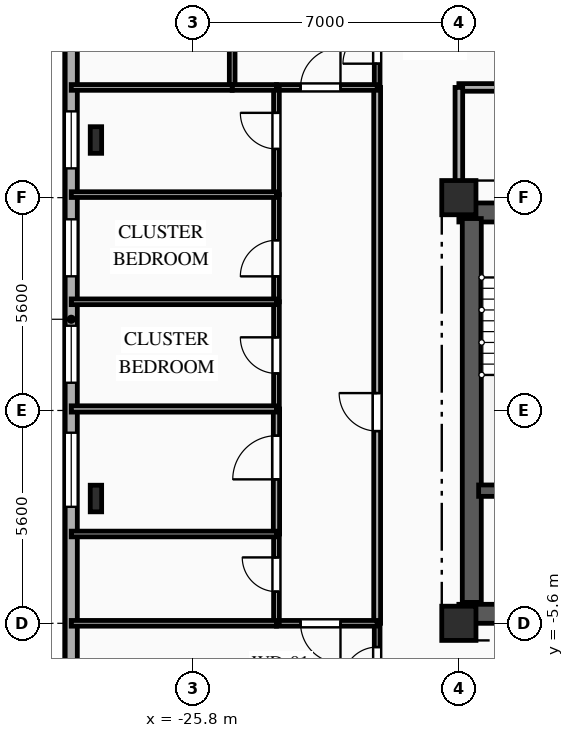
"""IFC4 building model, lengths in metres.
Left out: names, types, materials, properties, quantities, classifications, styles, units other than length and angle.
Written with IfcOpenShell. Run it as: python <this file> out.ifc"""

import sys

from ifc_helpers import new_model, si_unit, direction, frame, frame_2d, origin, origin_2d, place, context, subcontext, project, spatial, rectangle, i_section, extrude, element, fill, save


model = new_model("IFC4")
c1 = context("Model", 3, precision=1e-05, world=origin(), true_north=direction((0.0, 1.0)))
c2 = subcontext(c1, "Body", "Model", "MODEL_VIEW")
j1 = project(units=[si_unit("LENGTHUNIT", "METRE"), si_unit("PLANEANGLEUNIT", "RADIAN")], contexts=[c1])
p1 = place(None, origin())
s1 = spatial("IfcSite", under=j1, at=p1, CompositionType="ELEMENT")
p2 = place(p1, origin())
s2 = spatial("IfcBuilding", under=s1, at=p2, CompositionType="ELEMENT")
p3 = place(p2, frame((0.0, 0.0, 151.1)))
s3 = spatial("IfcBuildingStorey", under=s2, at=p3, CompositionType="ELEMENT", Elevation=151.1)
for number, where, z_axis, x_axis in (
    (1, (-18.8, -5.6, 0.0), (0.0, 0.0, 1.0), (1.0, 0.0, 0.0)),
    (2, (-18.8, 5.6, 0.0), (0.0, 0.0, 1.0), (1.0, 0.0, 0.0)),
):
    element("IfcColumn", number, at=place(p3, frame(where, z_axis=z_axis, x_axis=x_axis)), inside=s3, PredefinedType="COLUMN", context=c2, shape_type="SweptSolid", body=[
        extrude(rectangle(XDim=0.9, YDim=0.9, at=origin_2d()), origin(), (0.0, 0.0, 1.0), 3.35),
    ])
for number, where, z_axis, x_axis in (
    (3, (-28.35, 7.117, 0.0), (0.0, 0.0, 1.0), (1.0, 0.0, 0.0)),
    (4, (-28.35, -2.317, 0.0), (0.0, 0.0, 1.0), (1.0, 0.0, 0.0)),
):
    element("IfcColumn", number, at=place(p3, frame(where, z_axis=z_axis, x_axis=x_axis)), inside=s3, PredefinedType="COLUMN", context=c2, shape_type="SweptSolid", body=[
        extrude(i_section(OverallWidth=0.3, OverallDepth=0.7, WebThickness=0.017, FlangeThickness=0.032, FilletRadius=0.027, at=origin_2d()), origin(), (0.0, 0.0, 1.0), 3.35),
    ])
p4 = place(p3, frame((-29.0, -12.4, 0.0), z_axis=(0.0, 0.0, 1.0), x_axis=(0.0, 1.0, 0.0)))
e5 = element("IfcWall", 5, at=p4, inside=s3, PredefinedType="SOLIDWALL", context=c2, shape_type="SweptSolid", body=[
    extrude(rectangle(XDim=29.6, YDim=0.32, at=frame_2d((14.8, 0.0))), origin(), (0.0, 0.0, 1.0), 3.04),
])
p5 = place(p4, frame((2.855, 0.0, 0.85)))
e6 = element("IfcOpeningElement", 6, at=p5, cuts=e5, PredefinedType="OPENING", context=c2, shape_type="SweptSolid", body=[
    extrude(rectangle(XDim=1.65, YDim=1.85, at=frame_2d((0.825, 0.925))), frame((0.0, 0.17, 0.0), z_axis=(0.0, -1.0, 0.0), x_axis=(1.0, 0.0, 0.0)), (0.0, 0.0, 1.0), 0.34),
])
p6 = place(p4, frame((9.865, 0.0, 0.85)))
e7 = element("IfcOpeningElement", 7, at=p6, cuts=e5, PredefinedType="OPENING", context=c2, shape_type="SweptSolid", body=[
    extrude(rectangle(XDim=1.95, YDim=1.85, at=frame_2d((0.975, 0.925))), frame((0.0, 0.17, 0.0), z_axis=(0.0, -1.0, 0.0), x_axis=(1.0, 0.0, 0.0)), (0.0, 0.0, 1.0), 0.34),
])
p7 = place(p4, frame((13.13, 0.0, 0.85)))
e8 = element("IfcOpeningElement", 8, at=p7, cuts=e5, PredefinedType="OPENING", context=c2, shape_type="SweptSolid", body=[
    extrude(rectangle(XDim=1.5, YDim=1.85, at=frame_2d((0.75, 0.925))), frame((0.0, 0.17, 0.0), z_axis=(0.0, -1.0, 0.0), x_axis=(1.0, 0.0, 0.0)), (0.0, 0.0, 1.0), 0.34),
])
p8 = place(p4, frame((15.93, 0.0, 0.85)))
e9 = element("IfcOpeningElement", 9, at=p8, cuts=e5, PredefinedType="OPENING", context=c2, shape_type="SweptSolid", body=[
    extrude(rectangle(XDim=1.5, YDim=1.85, at=frame_2d((0.75, 0.925))), frame((0.0, 0.17, 0.0), z_axis=(0.0, -1.0, 0.0), x_axis=(1.0, 0.0, 0.0)), (0.0, 0.0, 1.0), 0.34),
])
p9 = place(p4, frame((18.77, 0.0, 0.85)))
e10 = element("IfcOpeningElement", 10, at=p9, cuts=e5, PredefinedType="OPENING", context=c2, shape_type="SweptSolid", body=[
    extrude(rectangle(XDim=1.5, YDim=1.85, at=frame_2d((0.75, 0.925))), frame((0.0, 0.17, 0.0), z_axis=(0.0, -1.0, 0.0), x_axis=(1.0, 0.0, 0.0)), (0.0, 0.0, 1.0), 0.34),
])
p10 = place(p4, frame((24.255, 0.0, 0.85)))
e11 = element("IfcOpeningElement", 11, at=p10, cuts=e5, PredefinedType="OPENING", context=c2, shape_type="SweptSolid", body=[
    extrude(rectangle(XDim=1.65, YDim=1.85, at=frame_2d((0.825, 0.925))), frame((0.0, 0.17, 0.0), z_axis=(0.0, -1.0, 0.0), x_axis=(1.0, 0.0, 0.0)), (0.0, 0.0, 1.0), 0.34),
])
p11 = place(p3, frame((-18.8, 5.21, 0.0), z_axis=(0.0, 0.0, 1.0), x_axis=(1.0, 0.0, 0.0)))
e12 = element("IfcWall", 12, at=p11, inside=s3, PredefinedType="SHEAR", context=c2, shape_type="SweptSolid", body=[
    extrude(rectangle(XDim=9.6, YDim=0.5, at=frame_2d((4.8, 0.0))), origin(), (0.0, 0.0, 1.0), 3.04),
])
p12 = place(p11, frame((1.55, 0.0, 0.0)))
e13 = element("IfcOpeningElement", 13, at=p12, cuts=e12, PredefinedType="OPENING", context=c2, shape_type="SweptSolid", body=[
    extrude(rectangle(XDim=1.1, YDim=2.15, at=frame_2d((0.55, 1.075))), frame((0.0, 0.26, 0.0), z_axis=(0.0, -1.0, 0.0), x_axis=(1.0, 0.0, 0.0)), (0.0, 0.0, 1.0), 0.52),
])
p13 = place(p11, frame((4.775, 0.0, 0.0)))
e14 = element("IfcOpeningElement", 14, at=p13, cuts=e12, PredefinedType="OPENING", context=c2, shape_type="SweptSolid", body=[
    extrude(rectangle(XDim=1.05, YDim=2.1, at=frame_2d((0.525, 1.05))), frame((0.0, 0.26, 0.0), z_axis=(0.0, -1.0, 0.0), x_axis=(1.0, 0.0, 0.0)), (0.0, 0.0, 1.0), 0.52),
])
p14 = place(p3, frame((-18.8, -5.35, 0.0), z_axis=(0.0, 0.0, 1.0), x_axis=(1.0, 0.0, 0.0)))
e15 = element("IfcWall", 15, at=p14, inside=s3, PredefinedType="SHEAR", context=c2, shape_type="SweptSolid", body=[
    extrude(rectangle(XDim=9.6, YDim=0.5, at=frame_2d((4.8, 0.0))), origin(), (0.0, 0.0, 1.0), 3.04),
])
p15 = place(p14, frame((1.05, 0.0, 0.0)))
e16 = element("IfcOpeningElement", 16, at=p15, cuts=e15, PredefinedType="OPENING", context=c2, shape_type="SweptSolid", body=[
    extrude(rectangle(XDim=0.9, YDim=2.1, at=frame_2d((0.45, 1.05))), frame((0.0, 0.26, 0.0), z_axis=(0.0, -1.0, 0.0), x_axis=(1.0, 0.0, 0.0)), (0.0, 0.0, 1.0), 0.52),
])
p16 = place(p3, frame((-18.46, -5.05, 0.0), z_axis=(0.0, 0.0, 1.0), x_axis=(0.0, 1.0, 0.0)))
e17 = element("IfcWall", 17, at=p16, inside=s3, PredefinedType="SHEAR", context=c2, shape_type="SweptSolid", body=[
    extrude(rectangle(XDim=10.1, YDim=0.5, at=frame_2d((5.05, 0.0))), origin(), (0.0, 0.0, 1.0), 3.04),
])
p17 = place(p3, frame((-18.28, -2.11, 0.0), z_axis=(0.0, 0.0, 1.0), x_axis=(1.0, 0.0, 0.0)))
e18 = element("IfcWall", 18, at=p17, inside=s3, PredefinedType="SHEAR", context=c2, shape_type="SweptSolid", body=[
    extrude(rectangle(XDim=3.18, YDim=0.3, at=frame_2d((1.59, 0.0))), origin(), (0.0, 0.0, 1.0), 3.04),
])
p18 = place(p3, frame((-12.0, 8.5, 0.0), z_axis=(0.0, 0.0, 1.0), x_axis=(-1.0, 0.0, 0.0)))
e19 = element("IfcWall", 19, at=p18, inside=s3, PredefinedType="PARTITIONING", context=c2, shape_type="SweptSolid", body=[
    extrude(rectangle(XDim=6.8, YDim=0.2, at=frame_2d((3.4, 0.0))), origin(), (0.0, 0.0, 1.0), 3.04),
])
p19 = place(p18, frame((1.715, 0.0, 0.0)))
e20 = element("IfcOpeningElement", 20, at=p19, cuts=e19, PredefinedType="OPENING", context=c2, shape_type="SweptSolid", body=[
    extrude(rectangle(XDim=1.1, YDim=2.15, at=frame_2d((0.55, 1.075))), frame((0.0, 0.11, 0.0), z_axis=(0.0, -1.0, 0.0), x_axis=(1.0, 0.0, 0.0)), (0.0, 0.0, 1.0), 0.22),
])
p20 = place(p3, frame((-18.8, 8.5, 0.0), z_axis=(0.0, 0.0, 1.0), x_axis=(0.0, -1.0, 0.0)))
e21 = element("IfcWall", 21, at=p20, inside=s3, PredefinedType="PARTITIONING", context=c2, shape_type="SweptSolid", body=[
    extrude(rectangle(XDim=2.9, YDim=0.2, at=frame_2d((1.45, 0.0))), origin(), (0.0, 0.0, 1.0), 2.525),
])
p21 = place(p3, frame((-20.95, 8.5, 0.0), z_axis=(0.0, 0.0, 1.0), x_axis=(0.0, 1.0, 0.0)))
e22 = element("IfcWall", 22, at=p21, inside=s3, PredefinedType="PARTITIONING", context=c2, shape_type="SweptSolid", body=[
    extrude(rectangle(XDim=2.15, YDim=0.15, at=frame_2d((1.075, 0.0))), origin(), (0.0, 0.0, 1.0), 3.04),
])
p22 = place(p21, frame((0.625, 0.0, 0.0)))
e23 = element("IfcOpeningElement", 23, at=p22, cuts=e22, PredefinedType="OPENING", context=c2, shape_type="SweptSolid", body=[
    extrude(rectangle(XDim=0.9, YDim=2.1, at=frame_2d((0.45, 1.05))), frame((0.0, 0.085, 0.0), z_axis=(0.0, -1.0, 0.0), x_axis=(1.0, 0.0, 0.0)), (0.0, 0.0, 1.0), 0.17),
])
p23 = place(p3, frame((-20.95, -7.75, 0.0), z_axis=(0.0, 0.0, 1.0), x_axis=(0.0, 1.0, 0.0)))
e24 = element("IfcWall", 24, at=p23, inside=s3, PredefinedType="PARTITIONING", context=c2, shape_type="SweptSolid", body=[
    extrude(rectangle(XDim=2.15, YDim=0.15, at=frame_2d((1.075, 0.0))), origin(), (0.0, 0.0, 1.0), 3.04),
])
p24 = place(p23, frame((0.625, 0.0, 0.0)))
e25 = element("IfcOpeningElement", 25, at=p24, cuts=e24, PredefinedType="OPENING", context=c2, shape_type="SweptSolid", body=[
    extrude(rectangle(XDim=0.9, YDim=2.1, at=frame_2d((0.45, 1.05))), frame((0.0, 0.085, 0.0), z_axis=(0.0, -1.0, 0.0), x_axis=(1.0, 0.0, 0.0)), (0.0, 0.0, 1.0), 0.17),
])
p25 = place(p3, frame((-20.95, -5.6, 0.0), z_axis=(0.0, 0.0, 1.0), x_axis=(0.0, 1.0, 0.0)))
e26 = element("IfcWall", 26, at=p25, inside=s3, PredefinedType="PARTITIONING", context=c2, shape_type="SweptSolid", body=[
    extrude(rectangle(XDim=14.1, YDim=0.18, at=frame_2d((7.05, 0.0))), origin(), (0.0, 0.0, 1.0), 3.04),
])
p26 = place(p25, frame((5.058, 0.0, 0.0)))
e27 = element("IfcOpeningElement", 27, at=p26, cuts=e26, PredefinedType="OPENING", context=c2, shape_type="SweptSolid", body=[
    extrude(rectangle(XDim=1.0, YDim=2.15, at=frame_2d((0.5, 1.075))), frame((0.0, 0.1, 0.0), z_axis=(0.0, -1.0, 0.0), x_axis=(1.0, 0.0, 0.0)), (0.0, 0.0, 1.0), 0.2),
])
p27 = place(p3, frame((-23.6, 8.5, 0.0), z_axis=(0.0, 0.0, 1.0), x_axis=(1.0, 0.0, 0.0)))
e28 = element("IfcWall", 28, at=p27, inside=s3, PredefinedType="PARTITIONING", context=c2, shape_type="SweptSolid", body=[
    extrude(rectangle(XDim=2.65, YDim=0.15, at=frame_2d((1.325, 0.0))), origin(), (0.0, 0.0, 1.0), 3.04),
])
p28 = place(p27, frame((0.635, 0.0, 0.0)))
e29 = element("IfcOpeningElement", 29, at=p28, cuts=e28, PredefinedType="OPENING", context=c2, shape_type="SweptSolid", body=[
    extrude(rectangle(XDim=1.05, YDim=2.15, at=frame_2d((0.525, 1.075))), frame((0.0, 0.085, 0.0), z_axis=(0.0, -1.0, 0.0), x_axis=(1.0, 0.0, 0.0)), (0.0, 0.0, 1.0), 0.17),
])
p29 = place(p3, frame((-20.95, -5.6, 0.0), z_axis=(0.0, 0.0, 1.0), x_axis=(-1.0, 0.0, 0.0)))
e30 = element("IfcWall", 30, at=p29, inside=s3, PredefinedType="PARTITIONING", context=c2, shape_type="SweptSolid", body=[
    extrude(rectangle(XDim=2.65, YDim=0.15, at=frame_2d((1.325, 0.0))), origin(), (0.0, 0.0, 1.0), 3.04),
])
p30 = place(p29, frame((0.965, 0.0, 0.0)))
e31 = element("IfcOpeningElement", 31, at=p30, cuts=e30, PredefinedType="OPENING", context=c2, shape_type="SweptSolid", body=[
    extrude(rectangle(XDim=1.05, YDim=2.15, at=frame_2d((0.525, 1.075))), frame((0.0, 0.085, 0.0), z_axis=(0.0, -1.0, 0.0), x_axis=(1.0, 0.0, 0.0)), (0.0, 0.0, 1.0), 0.17),
])
p31 = place(p3, frame((-23.6, -5.6, 0.0), z_axis=(0.0, 0.0, 1.0), x_axis=(0.0, 1.0, 0.0)))
e32 = element("IfcWall", 32, at=p31, inside=s3, PredefinedType="PLUMBINGWALL", context=c2, shape_type="SweptSolid", body=[
    extrude(rectangle(XDim=2.35, YDim=0.15, at=frame_2d((1.175, 0.0))), origin(), (0.0, 0.0, 1.0), 2.695),
])
p32 = place(p31, frame((0.834, 0.0, 0.0)))
e33 = element("IfcOpeningElement", 33, at=p32, cuts=e32, PredefinedType="OPENING", context=c2, shape_type="SweptSolid", body=[
    extrude(rectangle(XDim=0.9, YDim=2.1, at=frame_2d((0.45, 1.05))), frame((0.0, 0.085, 0.0), z_axis=(0.0, -1.0, 0.0), x_axis=(1.0, 0.0, 0.0)), (0.0, 0.0, 1.0), 0.17),
])
p33 = place(p3, frame((-23.6, -3.25, 0.0), z_axis=(0.0, 0.0, 1.0), x_axis=(0.0, 1.0, 0.0)))
e34 = element("IfcWall", 34, at=p33, inside=s3, PredefinedType="PARTITIONING", context=c2, shape_type="SweptSolid", body=[
    extrude(rectangle(XDim=3.29, YDim=0.165, at=frame_2d((1.645, 0.0))), origin(), (0.0, 0.0, 1.0), 2.695),
])
p34 = place(p33, frame((1.438, 0.0, 0.0)))
e35 = element("IfcOpeningElement", 35, at=p34, cuts=e34, PredefinedType="OPENING", context=c2, shape_type="SweptSolid", body=[
    extrude(rectangle(XDim=1.15, YDim=2.15, at=frame_2d((0.575, 1.075))), frame((0.0, 0.093, 0.0), z_axis=(0.0, -1.0, 0.0), x_axis=(1.0, 0.0, 0.0)), (0.0, 0.0, 1.0), 0.185),
])
p35 = place(p3, frame((-23.6, 0.04, 0.0), z_axis=(0.0, 0.0, 1.0), x_axis=(0.0, 1.0, 0.0)))
e36 = element("IfcWall", 36, at=p35, inside=s3, PredefinedType="PARTITIONING", context=c2, shape_type="SweptSolid", body=[
    extrude(rectangle(XDim=2.82, YDim=0.15, at=frame_2d((1.41, 0.0))), origin(), (0.0, 0.0, 1.0), 2.695),
])
p36 = place(p35, frame((0.935, 0.0, 0.0)))
e37 = element("IfcOpeningElement", 37, at=p36, cuts=e36, PredefinedType="OPENING", context=c2, shape_type="SweptSolid", body=[
    extrude(rectangle(XDim=0.95, YDim=2.1, at=frame_2d((0.475, 1.05))), frame((0.0, 0.085, 0.0), z_axis=(0.0, -1.0, 0.0), x_axis=(1.0, 0.0, 0.0)), (0.0, 0.0, 1.0), 0.17),
])
p37 = place(p3, frame((-23.6, 2.86, 0.0), z_axis=(0.0, 0.0, 1.0), x_axis=(0.0, 1.0, 0.0)))
e38 = element("IfcWall", 38, at=p37, inside=s3, PredefinedType="PARTITIONING", context=c2, shape_type="SweptSolid", body=[
    extrude(rectangle(XDim=2.82, YDim=0.15, at=frame_2d((1.41, 0.0))), origin(), (0.0, 0.0, 1.0), 2.695),
])
p38 = place(p37, frame((0.669, 0.0, 0.0)))
e39 = element("IfcOpeningElement", 39, at=p38, cuts=e38, PredefinedType="OPENING", context=c2, shape_type="SweptSolid", body=[
    extrude(rectangle(XDim=0.95, YDim=2.1, at=frame_2d((0.475, 1.05))), frame((0.0, 0.085, 0.0), z_axis=(0.0, -1.0, 0.0), x_axis=(1.0, 0.0, 0.0)), (0.0, 0.0, 1.0), 0.17),
])
p39 = place(p3, frame((-23.6, 5.68, 0.0), z_axis=(0.0, 0.0, 1.0), x_axis=(0.0, 1.0, 0.0)))
e40 = element("IfcWall", 40, at=p39, inside=s3, PredefinedType="PARTITIONING", context=c2, shape_type="SweptSolid", body=[
    extrude(rectangle(XDim=2.82, YDim=0.15, at=frame_2d((1.41, 0.0))), origin(), (0.0, 0.0, 1.0), 2.695),
])
p40 = place(p39, frame((1.201, 0.0, 0.0)))
e41 = element("IfcOpeningElement", 41, at=p40, cuts=e40, PredefinedType="OPENING", context=c2, shape_type="SweptSolid", body=[
    extrude(rectangle(XDim=0.95, YDim=2.1, at=frame_2d((0.475, 1.05))), frame((0.0, 0.085, 0.0), z_axis=(0.0, -1.0, 0.0), x_axis=(1.0, 0.0, 0.0)), (0.0, 0.0, 1.0), 0.17),
])
p41 = place(p3, frame((-24.765, 8.5, 0.0), z_axis=(0.0, 0.0, 1.0), x_axis=(0.0, 1.0, 0.0)))
e42 = element("IfcWall", 42, at=p41, inside=s3, PredefinedType="PARTITIONING", context=c2, shape_type="SweptSolid", body=[
    extrude(rectangle(XDim=11.9, YDim=0.15, at=frame_2d((5.95, 0.0))), origin(), (0.0, 0.0, 1.0), 3.04),
])
p42 = place(p41, frame((3.002, 0.0, 0.0)))
e43 = element("IfcOpeningElement", 43, at=p42, cuts=e42, PredefinedType="OPENING", context=c2, shape_type="SweptSolid", body=[
    extrude(rectangle(XDim=1.05, YDim=2.15, at=frame_2d((0.525, 1.075))), frame((0.0, 0.085, 0.0), z_axis=(0.0, -1.0, 0.0), x_axis=(1.0, 0.0, 0.0)), (0.0, 0.0, 1.0), 0.17),
])
p43 = place(p3, frame((-23.6, 8.5, 0.0), z_axis=(0.0, 0.0, 1.0), x_axis=(-1.0, 0.0, 0.0)))
e44 = element("IfcWall", 44, at=p43, inside=s3, PredefinedType="PARTITIONING", context=c2, shape_type="SweptSolid", body=[
    extrude(rectangle(XDim=1.165, YDim=0.15, at=frame_2d((0.583, 0.0))), origin(), (0.0, 0.0, 1.0), 3.04),
])
p44 = place(p3, frame((-24.765, 8.5, 0.0), z_axis=(0.0, 0.0, 1.0), x_axis=(-1.0, 0.0, 0.0)))
e45 = element("IfcWall", 45, at=p44, inside=s3, PredefinedType="PARTITIONING", context=c2, shape_type="SweptSolid", body=[
    extrude(rectangle(XDim=4.235, YDim=0.15, at=frame_2d((2.118, 0.0))), origin(), (0.0, 0.0, 1.0), 3.04),
])
for number, where, z_axis, x_axis in (
    (46, (-29.0, -5.6, 0.0), (0.0, 0.0, 1.0), (1.0, 0.0, 0.0)),
    (47, (-29.0, -3.25, 0.0), (0.0, 0.0, 1.0), (1.0, 0.0, 0.0)),
):
    element("IfcWall", number, at=place(p3, frame(where, z_axis=z_axis, x_axis=x_axis)), inside=s3, PredefinedType="PLUMBINGWALL", context=c2, shape_type="SweptSolid", body=[
        extrude(rectangle(XDim=5.4, YDim=0.15, at=frame_2d((2.7, 0.0))), origin(), (0.0, 0.0, 1.0), 3.04),
    ])
p45 = place(p3, frame((-29.0, 0.04, 0.0), z_axis=(0.0, 0.0, 1.0), x_axis=(1.0, 0.0, 0.0)))
e48 = element("IfcWall", 48, at=p45, inside=s3, PredefinedType="PARTITIONING", context=c2, shape_type="SweptSolid", body=[
    extrude(rectangle(XDim=5.4, YDim=0.165, at=frame_2d((2.7, 0.0))), origin(), (0.0, 0.0, 1.0), 3.04),
])
for number, where, z_axis, x_axis in (
    (49, (-29.0, 2.86, 0.0), (0.0, 0.0, 1.0), (1.0, 0.0, 0.0)),
    (50, (-29.0, 5.68, 0.0), (0.0, 0.0, 1.0), (1.0, 0.0, 0.0)),
):
    element("IfcWall", number, at=place(p3, frame(where, z_axis=z_axis, x_axis=x_axis)), inside=s3, PredefinedType="PARTITIONING", context=c2, shape_type="SweptSolid", body=[
        extrude(rectangle(XDim=5.4, YDim=0.15, at=frame_2d((2.7, 0.0))), origin(), (0.0, 0.0, 1.0), 3.04),
    ])
p46 = place(p6, origin())
e51 = element("IfcWindow", 51, at=p46, inside=s3, PartitioningType="SINGLE_PANEL", PredefinedType="WINDOW", context=c2, shape_type="SweptSolid", body=[
    extrude(rectangle(XDim=1.95, YDim=1.85, at=frame_2d((0.975, 0.925))), frame((0.0, 0.03, 0.0), z_axis=(0.0, -1.0, 0.0), x_axis=(1.0, 0.0, 0.0)), (0.0, 0.0, 1.0), 0.06),
])
fill(e7, e51)
p47 = place(p7, origin())
e52 = element("IfcWindow", 52, at=p47, inside=s3, PartitioningType="SINGLE_PANEL", PredefinedType="WINDOW", context=c2, shape_type="SweptSolid", body=[
    extrude(rectangle(XDim=1.5, YDim=1.85, at=frame_2d((0.75, 0.925))), frame((0.0, 0.03, 0.0), z_axis=(0.0, -1.0, 0.0), x_axis=(1.0, 0.0, 0.0)), (0.0, 0.0, 1.0), 0.06),
])
fill(e8, e52)
p48 = place(p8, origin())
e53 = element("IfcWindow", 53, at=p48, inside=s3, PartitioningType="SINGLE_PANEL", PredefinedType="WINDOW", context=c2, shape_type="SweptSolid", body=[
    extrude(rectangle(XDim=1.5, YDim=1.85, at=frame_2d((0.75, 0.925))), frame((0.0, 0.03, 0.0), z_axis=(0.0, -1.0, 0.0), x_axis=(1.0, 0.0, 0.0)), (0.0, 0.0, 1.0), 0.06),
])
fill(e9, e53)
p49 = place(p9, origin())
e54 = element("IfcWindow", 54, at=p49, inside=s3, PartitioningType="SINGLE_PANEL", PredefinedType="WINDOW", context=c2, shape_type="SweptSolid", body=[
    extrude(rectangle(XDim=1.5, YDim=1.85, at=frame_2d((0.75, 0.925))), frame((0.0, 0.03, 0.0), z_axis=(0.0, -1.0, 0.0), x_axis=(1.0, 0.0, 0.0)), (0.0, 0.0, 1.0), 0.06),
])
fill(e10, e54)
p50 = place(p22, origin())
e55 = element("IfcDoor", 55, at=p50, inside=s3, OperationType="SINGLE_SWING_LEFT", PredefinedType="DOOR", context=c2, shape_type="SweptSolid", body=[
    extrude(rectangle(XDim=0.9, YDim=2.1, at=frame_2d((0.45, 1.05))), frame((0.0, 0.025, 0.0), z_axis=(0.0, -1.0, 0.0), x_axis=(1.0, 0.0, 0.0)), (0.0, 0.0, 1.0), 0.05),
])
fill(e23, e55)
p51 = place(p24, origin())
e56 = element("IfcDoor", 56, at=p51, inside=s3, OperationType="SINGLE_SWING_LEFT", PredefinedType="DOOR", context=c2, shape_type="SweptSolid", body=[
    extrude(rectangle(XDim=0.9, YDim=2.1, at=frame_2d((0.45, 1.05))), frame((0.0, 0.025, 0.0), z_axis=(0.0, -1.0, 0.0), x_axis=(1.0, 0.0, 0.0)), (0.0, 0.0, 1.0), 0.05),
])
fill(e25, e56)
p52 = place(p26, origin())
e57 = element("IfcDoor", 57, at=p52, inside=s3, OperationType="SINGLE_SWING_RIGHT", PredefinedType="DOOR", context=c2, shape_type="SweptSolid", body=[
    extrude(rectangle(XDim=1.0, YDim=2.15, at=frame_2d((0.5, 1.075))), frame((0.0, 0.025, 0.0), z_axis=(0.0, -1.0, 0.0), x_axis=(1.0, 0.0, 0.0)), (0.0, 0.0, 1.0), 0.05),
])
fill(e27, e57)
p53 = place(p28, origin())
e58 = element("IfcDoor", 58, at=p53, inside=s3, OperationType="SINGLE_SWING_RIGHT", PredefinedType="DOOR", context=c2, shape_type="SweptSolid", body=[
    extrude(rectangle(XDim=1.05, YDim=2.15, at=frame_2d((0.525, 1.075))), frame((0.0, 0.025, 0.0), z_axis=(0.0, -1.0, 0.0), x_axis=(1.0, 0.0, 0.0)), (0.0, 0.0, 1.0), 0.05),
])
fill(e29, e58)
p54 = place(p30, origin())
e59 = element("IfcDoor", 59, at=p54, inside=s3, OperationType="SINGLE_SWING_LEFT", PredefinedType="DOOR", context=c2, shape_type="SweptSolid", body=[
    extrude(rectangle(XDim=1.05, YDim=2.15, at=frame_2d((0.525, 1.075))), frame((0.0, 0.025, 0.0), z_axis=(0.0, -1.0, 0.0), x_axis=(1.0, 0.0, 0.0)), (0.0, 0.0, 1.0), 0.05),
])
fill(e31, e59)
p55 = place(p32, origin())
e60 = element("IfcDoor", 60, at=p55, inside=s3, OperationType="SINGLE_SWING_RIGHT", PredefinedType="DOOR", context=c2, shape_type="SweptSolid", body=[
    extrude(rectangle(XDim=0.9, YDim=2.1, at=frame_2d((0.45, 1.05))), frame((0.0, 0.025, 0.0), z_axis=(0.0, -1.0, 0.0), x_axis=(1.0, 0.0, 0.0)), (0.0, 0.0, 1.0), 0.05),
])
fill(e33, e60)
p56 = place(p34, origin())
e61 = element("IfcDoor", 61, at=p56, inside=s3, OperationType="SINGLE_SWING_LEFT", PredefinedType="DOOR", context=c2, shape_type="SweptSolid", body=[
    extrude(rectangle(XDim=1.15, YDim=2.15, at=frame_2d((0.575, 1.075))), frame((0.0, 0.025, 0.0), z_axis=(0.0, -1.0, 0.0), x_axis=(1.0, 0.0, 0.0)), (0.0, 0.0, 1.0), 0.05),
])
fill(e35, e61)
p57 = place(p36, origin())
e62 = element("IfcDoor", 62, at=p57, inside=s3, OperationType="SINGLE_SWING_RIGHT", PredefinedType="DOOR", context=c2, shape_type="SweptSolid", body=[
    extrude(rectangle(XDim=0.95, YDim=2.1, at=frame_2d((0.475, 1.05))), frame((0.0, 0.025, 0.0), z_axis=(0.0, -1.0, 0.0), x_axis=(1.0, 0.0, 0.0)), (0.0, 0.0, 1.0), 0.05),
])
fill(e37, e62)
p58 = place(p38, origin())
e63 = element("IfcDoor", 63, at=p58, inside=s3, OperationType="SINGLE_SWING_LEFT", PredefinedType="DOOR", context=c2, shape_type="SweptSolid", body=[
    extrude(rectangle(XDim=0.95, YDim=2.1, at=frame_2d((0.475, 1.05))), frame((0.0, 0.025, 0.0), z_axis=(0.0, -1.0, 0.0), x_axis=(1.0, 0.0, 0.0)), (0.0, 0.0, 1.0), 0.05),
])
fill(e39, e63)
p59 = place(p40, origin())
e64 = element("IfcDoor", 64, at=p59, inside=s3, OperationType="SINGLE_SWING_RIGHT", PredefinedType="DOOR", context=c2, shape_type="SweptSolid", body=[
    extrude(rectangle(XDim=0.95, YDim=2.1, at=frame_2d((0.475, 1.05))), frame((0.0, 0.025, 0.0), z_axis=(0.0, -1.0, 0.0), x_axis=(1.0, 0.0, 0.0)), (0.0, 0.0, 1.0), 0.05),
])
fill(e41, e64)
save(model, sys.argv[1])
